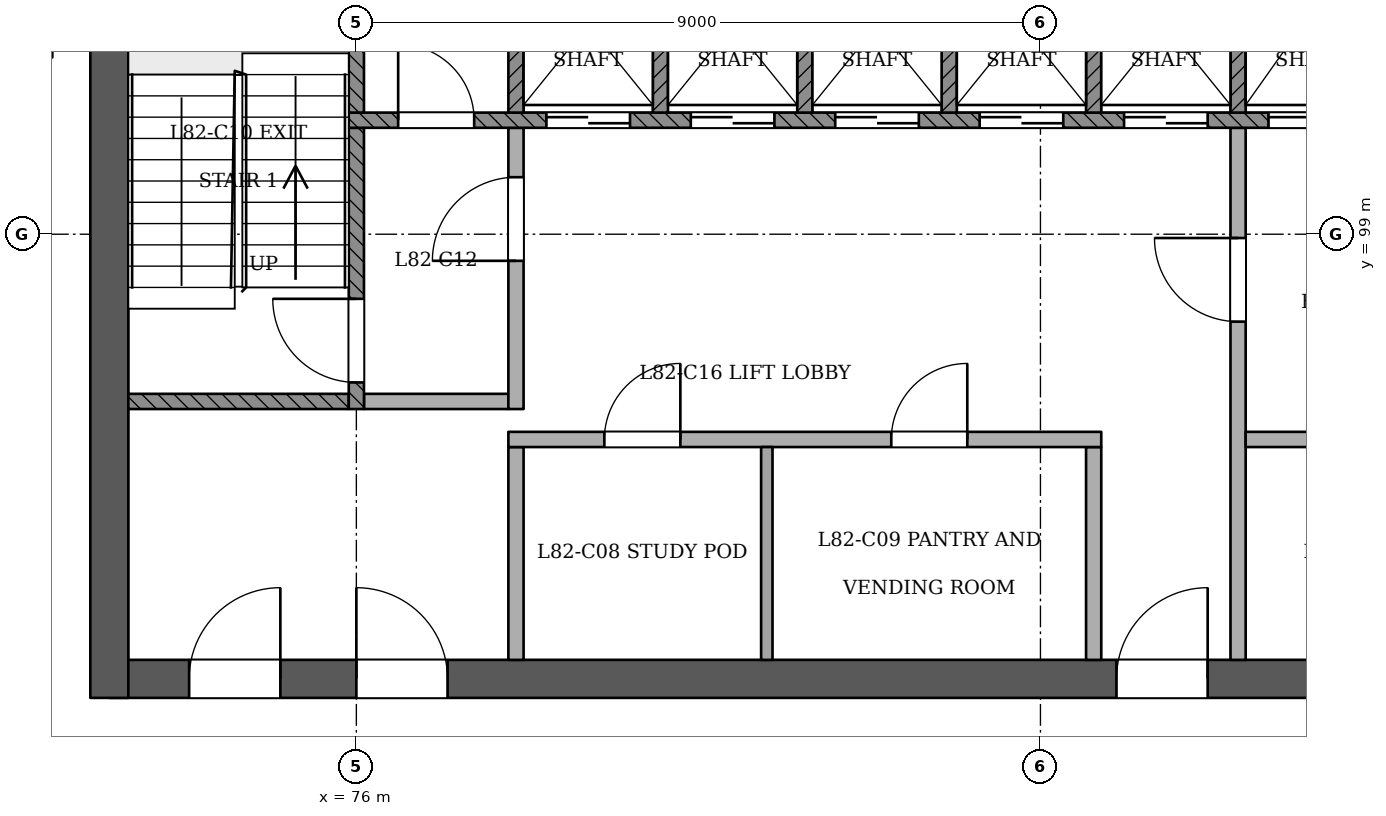
"""IFC4 building model, lengths in metres.
Left out: names, types, materials, properties, quantities, classifications, styles, units other than length and angle.
Written with IfcOpenShell. Run it as: python <this file> out.ifc"""

import sys

from ifc_helpers import new_model, si_unit, direction, frame, frame_2d, origin, place, context, subcontext, project, spatial, rectangle, extrude, element, fill, save


model = new_model("IFC4")
c1 = context("Model", 3, precision=1e-05, world=origin(), true_north=direction((0.0, 1.0)))
c2 = subcontext(c1, "Body", "Model", "MODEL_VIEW")
j1 = project(units=[si_unit("LENGTHUNIT", "METRE"), si_unit("PLANEANGLEUNIT", "RADIAN")], contexts=[c1])
p1 = place(None, origin())
s1 = spatial("IfcSite", under=j1, at=p1, CompositionType="ELEMENT")
p2 = place(p1, origin())
s2 = spatial("IfcBuilding", under=s1, at=p2, CompositionType="ELEMENT")
p3 = place(p2, frame((0.0, 0.0, 316.6)))
s3 = spatial("IfcBuildingStorey", under=s2, at=p3, CompositionType="ELEMENT", Elevation=316.6)
p4 = place(p3, frame((72.75, 93.15, 0.0), z_axis=(0.0, 0.0, 1.0), x_axis=(1.0, 0.0, 0.0)))
e1 = element("IfcWall", 1, at=p4, inside=s3, PredefinedType="SHEAR", context=c2, shape_type="SweptSolid", body=[
    extrude(rectangle(XDim=24.75, YDim=0.5, at=frame_2d((12.375, 0.0))), origin(), (0.0, 0.0, 1.0), 3.6),
])
p5 = place(p4, frame((1.05, 0.0, 0.0)))
e2 = element("IfcOpeningElement", 2, at=p5, cuts=e1, PredefinedType="OPENING", context=c2, shape_type="SweptSolid", body=[
    extrude(rectangle(XDim=1.2, YDim=2.1, at=frame_2d((0.6, 1.05))), frame((0.0, 0.26, 0.0), z_axis=(0.0, -1.0, 0.0), x_axis=(1.0, 0.0, 0.0)), (0.0, 0.0, 1.0), 0.521),
])
p6 = place(p4, frame((3.25, 0.0, 0.0)))
e3 = element("IfcOpeningElement", 3, at=p6, cuts=e1, PredefinedType="OPENING", context=c2, shape_type="SweptSolid", body=[
    extrude(rectangle(XDim=1.2, YDim=2.1, at=frame_2d((0.6, 1.05))), frame((0.0, 0.26, 0.0), z_axis=(0.0, -1.0, 0.0), x_axis=(1.0, 0.0, 0.0)), (0.0, 0.0, 1.0), 0.521),
])
p7 = place(p4, frame((13.25, 0.0, 0.0)))
e4 = element("IfcOpeningElement", 4, at=p7, cuts=e1, PredefinedType="OPENING", context=c2, shape_type="SweptSolid", body=[
    extrude(rectangle(XDim=1.2, YDim=2.1, at=frame_2d((0.6, 1.05))), frame((0.0, 0.26, 0.0), z_axis=(0.0, -1.0, 0.0), x_axis=(1.0, 0.0, 0.0)), (0.0, 0.0, 1.0), 0.521),
])
p8 = place(p4, frame((16.663, 0.0, 0.0)))
e5 = element("IfcOpeningElement", 5, at=p8, cuts=e1, PredefinedType="OPENING", context=c2, shape_type="SweptSolid", body=[
    extrude(rectangle(XDim=1.0, YDim=2.1, at=frame_2d((0.5, 1.05))), frame((0.0, 0.26, 0.0), z_axis=(0.0, -1.0, 0.0), x_axis=(1.0, 0.0, 0.0)), (0.0, 0.0, 1.0), 0.521),
])
p9 = place(p4, frame((20.55, 0.0, 0.0)))
e6 = element("IfcOpeningElement", 6, at=p9, cuts=e1, PredefinedType="OPENING", context=c2, shape_type="SweptSolid", body=[
    extrude(rectangle(XDim=1.0, YDim=2.1, at=frame_2d((0.5, 1.05))), frame((0.0, 0.26, 0.0), z_axis=(0.0, -1.0, 0.0), x_axis=(1.0, 0.0, 0.0)), (0.0, 0.0, 1.0), 0.521),
])
p10 = place(p4, frame((22.988, 0.0, 0.0)))
e7 = element("IfcOpeningElement", 7, at=p10, cuts=e1, PredefinedType="OPENING", context=c2, shape_type="SweptSolid", body=[
    extrude(rectangle(XDim=1.0, YDim=2.1, at=frame_2d((0.5, 1.05))), frame((0.0, 0.26, 0.0), z_axis=(0.0, -1.0, 0.0), x_axis=(1.0, 0.0, 0.0)), (0.0, 0.0, 1.0), 0.521),
])
p11 = place(p3, frame((72.75, 103.65, 0.0), z_axis=(0.0, 0.0, 1.0), x_axis=(0.0, -1.0, 0.0)))
e8 = element("IfcWall", 8, at=p11, inside=s3, PredefinedType="SHEAR", context=c2, shape_type="SweptSolid", body=[
    extrude(rectangle(XDim=10.75, YDim=0.5, at=frame_2d((5.375, 0.0))), origin(), (0.0, 0.0, 1.0), 3.6),
])
p12 = place(p3, frame((78.1, 93.4, 0.0), z_axis=(0.0, 0.0, 1.0), x_axis=(0.0, 1.0, 0.0)))
e9 = element("IfcWall", 9, at=p12, inside=s3, PredefinedType="PARTITIONING", context=c2, shape_type="SweptSolid", body=[
    extrude(rectangle(XDim=2.8, YDim=0.2, at=frame_2d((1.4, 0.0))), origin(), (0.0, 0.0, 1.0), 3.2),
])
p13 = place(p3, frame((81.4, 93.4, 0.0), z_axis=(0.0, 0.0, 1.0), x_axis=(0.0, 1.0, 0.0)))
e10 = element("IfcWall", 10, at=p13, inside=s3, PredefinedType="PARTITIONING", context=c2, shape_type="SweptSolid", body=[
    extrude(rectangle(XDim=2.8, YDim=0.15, at=frame_2d((1.4, 0.0))), origin(), (0.0, 0.0, 1.0), 3.2),
])
p14 = place(p3, frame((85.7, 93.4, 0.0), z_axis=(0.0, 0.0, 1.0), x_axis=(0.0, 1.0, 0.0)))
e11 = element("IfcWall", 11, at=p14, inside=s3, PredefinedType="PARTITIONING", context=c2, shape_type="SweptSolid", body=[
    extrude(rectangle(XDim=2.8, YDim=0.2, at=frame_2d((1.4, 0.0))), origin(), (0.0, 0.0, 1.0), 3.2),
])
p15 = place(p3, frame((87.6, 93.4, 0.0), z_axis=(0.0, 0.0, 1.0), x_axis=(0.0, 1.0, 0.0)))
e12 = element("IfcWall", 12, at=p15, inside=s3, PredefinedType="PARTITIONING", context=c2, shape_type="SweptSolid", body=[
    extrude(rectangle(XDim=7.0, YDim=0.2, at=frame_2d((3.5, 0.0))), origin(), (0.0, 0.0, 1.0), 3.2),
])
p16 = place(p15, frame((4.45, 0.0, 0.0)))
e13 = element("IfcOpeningElement", 13, at=p16, cuts=e12, PredefinedType="OPENING", context=c2, shape_type="SweptSolid", body=[
    extrude(rectangle(XDim=1.1, YDim=2.1, at=frame_2d((0.55, 1.05))), frame((0.0, 0.11, 0.0), z_axis=(0.0, -1.0, 0.0), x_axis=(1.0, 0.0, 0.0)), (0.0, 0.0, 1.0), 0.221),
])
p17 = place(p3, frame((78.0, 96.3, 0.0), z_axis=(0.0, 0.0, 1.0), x_axis=(1.0, 0.0, 0.0)))
e14 = element("IfcWall", 14, at=p17, inside=s3, PredefinedType="PARTITIONING", context=c2, shape_type="SweptSolid", body=[
    extrude(rectangle(XDim=7.8, YDim=0.2, at=frame_2d((3.9, 0.0))), origin(), (0.0, 0.0, 1.0), 3.2),
])
p18 = place(p17, frame((1.262, 0.0, 0.0)))
e15 = element("IfcOpeningElement", 15, at=p18, cuts=e14, PredefinedType="OPENING", context=c2, shape_type="SweptSolid", body=[
    extrude(rectangle(XDim=1.0, YDim=2.1, at=frame_2d((0.5, 1.05))), frame((0.0, 0.11, 0.0), z_axis=(0.0, -1.0, 0.0), x_axis=(1.0, 0.0, 0.0)), (0.0, 0.0, 1.0), 0.221),
])
p19 = place(p17, frame((5.038, 0.0, 0.0)))
e16 = element("IfcOpeningElement", 16, at=p19, cuts=e14, PredefinedType="OPENING", context=c2, shape_type="SweptSolid", body=[
    extrude(rectangle(XDim=1.0, YDim=2.1, at=frame_2d((0.5, 1.05))), frame((0.0, 0.11, 0.0), z_axis=(0.0, -1.0, 0.0), x_axis=(1.0, 0.0, 0.0)), (0.0, 0.0, 1.0), 0.221),
])
p20 = place(p3, frame((87.7, 96.3, 0.0), z_axis=(0.0, 0.0, 1.0), x_axis=(1.0, 0.0, 0.0)))
e17 = element("IfcWall", 17, at=p20, inside=s3, PredefinedType="PARTITIONING", context=c2, shape_type="SweptSolid", body=[
    extrude(rectangle(XDim=3.6, YDim=0.2, at=frame_2d((1.8, 0.0))), origin(), (0.0, 0.0, 1.0), 3.2),
])
p21 = place(p3, frame((73.0, 96.8, 0.0), z_axis=(0.0, 0.0, 1.0), x_axis=(1.0, 0.0, 0.0)))
e18 = element("IfcWall", 18, at=p21, inside=s3, PredefinedType="SOLIDWALL", context=c2, shape_type="SweptSolid", body=[
    extrude(rectangle(XDim=2.9, YDim=0.2, at=frame_2d((1.45, 0.0))), origin(), (0.0, 0.0, 1.0), 3.2),
])
p22 = place(p3, frame((76.0, 96.7, 0.0), z_axis=(0.0, 0.0, 1.0), x_axis=(0.0, 1.0, 0.0)))
e19 = element("IfcWall", 19, at=p22, inside=s3, PredefinedType="SOLIDWALL", context=c2, shape_type="SweptSolid", body=[
    extrude(rectangle(XDim=3.7, YDim=0.2, at=frame_2d((1.85, 0.0))), origin(), (0.0, 0.0, 1.0), 3.2),
])
p23 = place(p22, frame((0.35, 0.0, 0.0)))
e20 = element("IfcOpeningElement", 20, at=p23, cuts=e19, PredefinedType="OPENING", context=c2, shape_type="SweptSolid", body=[
    extrude(rectangle(XDim=1.1, YDim=2.1, at=frame_2d((0.55, 1.05))), frame((0.0, 0.11, 0.0), z_axis=(0.0, -1.0, 0.0), x_axis=(1.0, 0.0, 0.0)), (0.0, 0.0, 1.0), 0.221),
])
p24 = place(p3, frame((76.1, 96.8, 0.0), z_axis=(0.0, 0.0, 1.0), x_axis=(1.0, 0.0, 0.0)))
e21 = element("IfcWall", 21, at=p24, inside=s3, PredefinedType="PARTITIONING", context=c2, shape_type="SweptSolid", body=[
    extrude(rectangle(XDim=1.9, YDim=0.2, at=frame_2d((0.95, 0.0))), origin(), (0.0, 0.0, 1.0), 3.2),
])
p25 = place(p3, frame((78.1, 96.7, 0.0), z_axis=(0.0, 0.0, 1.0), x_axis=(0.0, 1.0, 0.0)))
e22 = element("IfcWall", 22, at=p25, inside=s3, PredefinedType="PARTITIONING", context=c2, shape_type="SweptSolid", body=[
    extrude(rectangle(XDim=3.7, YDim=0.2, at=frame_2d((1.85, 0.0))), origin(), (0.0, 0.0, 1.0), 3.2),
])
p26 = place(p25, frame((1.95, 0.0, 0.0)))
e23 = element("IfcOpeningElement", 23, at=p26, cuts=e22, PredefinedType="OPENING", context=c2, shape_type="SweptSolid", body=[
    extrude(rectangle(XDim=1.1, YDim=2.1, at=frame_2d((0.55, 1.05))), frame((0.0, 0.11, 0.0), z_axis=(0.0, -1.0, 0.0), x_axis=(1.0, 0.0, 0.0)), (0.0, 0.0, 1.0), 0.221),
])
p27 = place(p3, frame((75.9, 100.5, 0.0), z_axis=(0.0, 0.0, 1.0), x_axis=(1.0, 0.0, 0.0)))
e24 = element("IfcWall", 24, at=p27, inside=s3, PredefinedType="SOLIDWALL", context=c2, shape_type="SweptSolid", body=[
    extrude(rectangle(XDim=18.2, YDim=0.2, at=frame_2d((9.1, 0.0))), origin(), (0.0, 0.0, 1.0), 3.2),
])
p28 = place(p27, frame((2.6, 0.0, 0.0)))
e25 = element("IfcOpeningElement", 25, at=p28, cuts=e24, PredefinedType="OPENING", context=c2, shape_type="SweptSolid", body=[
    extrude(rectangle(XDim=1.1, YDim=2.1, at=frame_2d((0.55, 1.05))), frame((0.0, 0.11, 0.0), z_axis=(0.0, -1.0, 0.0), x_axis=(1.0, 0.0, 0.0)), (0.0, 0.0, 1.0), 0.221),
])
p29 = place(p27, frame((4.5, 0.0, 0.0)))
e26 = element("IfcOpeningElement", 26, at=p29, cuts=e24, PredefinedType="OPENING", context=c2, shape_type="SweptSolid", body=[
    extrude(rectangle(XDim=1.1, YDim=2.1, at=frame_2d((0.55, 1.05))), frame((0.0, 0.11, 0.0), z_axis=(0.0, -1.0, 0.0), x_axis=(1.0, 0.0, 0.0)), (0.0, 0.0, 1.0), 0.221),
])
p30 = place(p27, frame((6.4, 0.0, 0.0)))
e27 = element("IfcOpeningElement", 27, at=p30, cuts=e24, PredefinedType="OPENING", context=c2, shape_type="SweptSolid", body=[
    extrude(rectangle(XDim=1.1, YDim=2.1, at=frame_2d((0.55, 1.05))), frame((0.0, 0.11, 0.0), z_axis=(0.0, -1.0, 0.0), x_axis=(1.0, 0.0, 0.0)), (0.0, 0.0, 1.0), 0.221),
])
p31 = place(p27, frame((8.3, 0.0, 0.0)))
e28 = element("IfcOpeningElement", 28, at=p31, cuts=e24, PredefinedType="OPENING", context=c2, shape_type="SweptSolid", body=[
    extrude(rectangle(XDim=1.1, YDim=2.1, at=frame_2d((0.55, 1.05))), frame((0.0, 0.11, 0.0), z_axis=(0.0, -1.0, 0.0), x_axis=(1.0, 0.0, 0.0)), (0.0, 0.0, 1.0), 0.221),
])
p32 = place(p27, frame((10.2, 0.0, 0.0)))
e29 = element("IfcOpeningElement", 29, at=p32, cuts=e24, PredefinedType="OPENING", context=c2, shape_type="SweptSolid", body=[
    extrude(rectangle(XDim=1.1, YDim=2.1, at=frame_2d((0.55, 1.05))), frame((0.0, 0.11, 0.0), z_axis=(0.0, -1.0, 0.0), x_axis=(1.0, 0.0, 0.0)), (0.0, 0.0, 1.0), 0.221),
])
p33 = place(p27, frame((12.1, 0.0, 0.0)))
e30 = element("IfcOpeningElement", 30, at=p33, cuts=e24, PredefinedType="OPENING", context=c2, shape_type="SweptSolid", body=[
    extrude(rectangle(XDim=1.1, YDim=2.1, at=frame_2d((0.55, 1.05))), frame((0.0, 0.11, 0.0), z_axis=(0.0, -1.0, 0.0), x_axis=(1.0, 0.0, 0.0)), (0.0, 0.0, 1.0), 0.221),
])
p34 = place(p27, frame((14.0, 0.0, 0.0)))
e31 = element("IfcOpeningElement", 31, at=p34, cuts=e24, PredefinedType="OPENING", context=c2, shape_type="SweptSolid", body=[
    extrude(rectangle(XDim=1.1, YDim=2.1, at=frame_2d((0.55, 1.05))), frame((0.0, 0.11, 0.0), z_axis=(0.0, -1.0, 0.0), x_axis=(1.0, 0.0, 0.0)), (0.0, 0.0, 1.0), 0.221),
])
p35 = place(p27, frame((0.65, 0.0, 0.0)))
e32 = element("IfcOpeningElement", 32, at=p35, cuts=e24, PredefinedType="OPENING", context=c2, shape_type="SweptSolid", body=[
    extrude(rectangle(XDim=1.0, YDim=2.1, at=frame_2d((0.5, 1.05))), frame((0.0, 0.11, 0.0), z_axis=(0.0, -1.0, 0.0), x_axis=(1.0, 0.0, 0.0)), (0.0, 0.0, 1.0), 0.221),
])
p36 = place(p27, frame((16.3, 0.0, 0.0)))
e33 = element("IfcOpeningElement", 33, at=p36, cuts=e24, PredefinedType="OPENING", context=c2, shape_type="SweptSolid", body=[
    extrude(rectangle(XDim=1.0, YDim=2.1, at=frame_2d((0.5, 1.05))), frame((0.0, 0.11, 0.0), z_axis=(0.0, -1.0, 0.0), x_axis=(1.0, 0.0, 0.0)), (0.0, 0.0, 1.0), 0.221),
])
for number, where, z_axis, x_axis in (
    (34, (76.0, 100.6, 0.0), (0.0, 0.0, 1.0), (0.0, 1.0, 0.0)),
    (35, (78.1, 100.6, 0.0), (0.0, 0.0, 1.0), (0.0, 1.0, 0.0)),
    (36, (80.0, 100.6, 0.0), (0.0, 0.0, 1.0), (0.0, 1.0, 0.0)),
    (37, (81.9, 100.6, 0.0), (0.0, 0.0, 1.0), (0.0, 1.0, 0.0)),
    (38, (83.8, 100.6, 0.0), (0.0, 0.0, 1.0), (0.0, 1.0, 0.0)),
    (39, (85.7, 100.6, 0.0), (0.0, 0.0, 1.0), (0.0, 1.0, 0.0)),
    (40, (87.6, 100.6, 0.0), (0.0, 0.0, 1.0), (0.0, 1.0, 0.0)),
):
    element("IfcWall", number, at=place(p3, frame(where, z_axis=z_axis, x_axis=x_axis)), inside=s3, PredefinedType="SOLIDWALL", context=c2, shape_type="SweptSolid", body=[
        extrude(rectangle(XDim=2.8, YDim=0.2, at=frame_2d((1.4, 0.0))), origin(), (0.0, 0.0, 1.0), 3.2),
    ])
p37 = place(p28, origin())
e41 = element("IfcDoor", 41, at=p37, inside=s3, OperationType="SLIDING_TO_RIGHT", PredefinedType="NOTDEFINED", context=c2, shape_type="SweptSolid", body=[
    extrude(rectangle(XDim=1.1, YDim=2.1, at=frame_2d((0.55, 1.05))), frame((0.0, 0.025, 0.0), z_axis=(0.0, -1.0, 0.0), x_axis=(1.0, 0.0, 0.0)), (0.0, 0.0, 1.0), 0.05),
])
fill(e25, e41)
p38 = place(p29, origin())
e42 = element("IfcDoor", 42, at=p38, inside=s3, OperationType="SLIDING_TO_LEFT", PredefinedType="NOTDEFINED", context=c2, shape_type="SweptSolid", body=[
    extrude(rectangle(XDim=1.1, YDim=2.1, at=frame_2d((0.55, 1.05))), frame((0.0, 0.025, 0.0), z_axis=(0.0, -1.0, 0.0), x_axis=(1.0, 0.0, 0.0)), (0.0, 0.0, 1.0), 0.05),
])
fill(e26, e42)
p39 = place(p30, origin())
e43 = element("IfcDoor", 43, at=p39, inside=s3, OperationType="SLIDING_TO_RIGHT", PredefinedType="NOTDEFINED", context=c2, shape_type="SweptSolid", body=[
    extrude(rectangle(XDim=1.1, YDim=2.1, at=frame_2d((0.55, 1.05))), frame((0.0, 0.025, 0.0), z_axis=(0.0, -1.0, 0.0), x_axis=(1.0, 0.0, 0.0)), (0.0, 0.0, 1.0), 0.05),
])
fill(e27, e43)
p40 = place(p31, origin())
e44 = element("IfcDoor", 44, at=p40, inside=s3, OperationType="SLIDING_TO_LEFT", PredefinedType="NOTDEFINED", context=c2, shape_type="SweptSolid", body=[
    extrude(rectangle(XDim=1.1, YDim=2.1, at=frame_2d((0.55, 1.05))), frame((0.0, 0.025, 0.0), z_axis=(0.0, -1.0, 0.0), x_axis=(1.0, 0.0, 0.0)), (0.0, 0.0, 1.0), 0.05),
])
fill(e28, e44)
p41 = place(p32, origin())
e45 = element("IfcDoor", 45, at=p41, inside=s3, OperationType="SLIDING_TO_RIGHT", PredefinedType="NOTDEFINED", context=c2, shape_type="SweptSolid", body=[
    extrude(rectangle(XDim=1.1, YDim=2.1, at=frame_2d((0.55, 1.05))), frame((0.0, 0.025, 0.0), z_axis=(0.0, -1.0, 0.0), x_axis=(1.0, 0.0, 0.0)), (0.0, 0.0, 1.0), 0.05),
])
fill(e29, e45)
p42 = place(p33, origin())
e46 = element("IfcDoor", 46, at=p42, inside=s3, OperationType="SLIDING_TO_RIGHT", PredefinedType="NOTDEFINED", context=c2, shape_type="SweptSolid", body=[
    extrude(rectangle(XDim=1.1, YDim=2.1, at=frame_2d((0.55, 1.05))), frame((0.0, 0.025, 0.0), z_axis=(0.0, -1.0, 0.0), x_axis=(1.0, 0.0, 0.0)), (0.0, 0.0, 1.0), 0.05),
])
fill(e30, e46)
p43 = place(p23, origin())
e47 = element("IfcDoor", 47, at=p43, inside=s3, OperationType="SINGLE_SWING_RIGHT", PredefinedType="NOTDEFINED", context=c2, shape_type="SweptSolid", body=[
    extrude(rectangle(XDim=1.1, YDim=2.1, at=frame_2d((0.55, 1.05))), frame((0.0, 0.025, 0.0), z_axis=(0.0, -1.0, 0.0), x_axis=(1.0, 0.0, 0.0)), (0.0, 0.0, 1.0), 0.05),
])
fill(e20, e47)
p44 = place(p26, origin())
e48 = element("IfcDoor", 48, at=p44, inside=s3, OperationType="SINGLE_SWING_LEFT", PredefinedType="NOTDEFINED", context=c2, shape_type="SweptSolid", body=[
    extrude(rectangle(XDim=1.1, YDim=2.1, at=frame_2d((0.55, 1.05))), frame((0.0, 0.025, 0.0), z_axis=(0.0, -1.0, 0.0), x_axis=(1.0, 0.0, 0.0)), (0.0, 0.0, 1.0), 0.05),
])
fill(e23, e48)
p45 = place(p16, origin())
e49 = element("IfcDoor", 49, at=p45, inside=s3, OperationType="SINGLE_SWING_RIGHT", PredefinedType="NOTDEFINED", context=c2, shape_type="SweptSolid", body=[
    extrude(rectangle(XDim=1.1, YDim=2.1, at=frame_2d((0.55, 1.05))), frame((0.0, 0.025, 0.0), z_axis=(0.0, -1.0, 0.0), x_axis=(1.0, 0.0, 0.0)), (0.0, 0.0, 1.0), 0.05),
])
fill(e13, e49)
p46 = place(p5, origin())
e50 = element("IfcDoor", 50, at=p46, inside=s3, OperationType="SINGLE_SWING_RIGHT", PredefinedType="NOTDEFINED", context=c2, shape_type="SweptSolid", body=[
    extrude(rectangle(XDim=1.2, YDim=2.1, at=frame_2d((0.6, 1.05))), frame((0.0, 0.025, 0.0), z_axis=(0.0, -1.0, 0.0), x_axis=(1.0, 0.0, 0.0)), (0.0, 0.0, 1.0), 0.05),
])
fill(e2, e50)
p47 = place(p6, origin())
e51 = element("IfcDoor", 51, at=p47, inside=s3, OperationType="SINGLE_SWING_LEFT", PredefinedType="NOTDEFINED", context=c2, shape_type="SweptSolid", body=[
    extrude(rectangle(XDim=1.2, YDim=2.1, at=frame_2d((0.6, 1.05))), frame((0.0, 0.025, 0.0), z_axis=(0.0, -1.0, 0.0), x_axis=(1.0, 0.0, 0.0)), (0.0, 0.0, 1.0), 0.05),
])
fill(e3, e51)
p48 = place(p7, origin())
e52 = element("IfcDoor", 52, at=p48, inside=s3, OperationType="SINGLE_SWING_RIGHT", PredefinedType="NOTDEFINED", context=c2, shape_type="SweptSolid", body=[
    extrude(rectangle(XDim=1.2, YDim=2.1, at=frame_2d((0.6, 1.05))), frame((0.0, 0.025, 0.0), z_axis=(0.0, -1.0, 0.0), x_axis=(1.0, 0.0, 0.0)), (0.0, 0.0, 1.0), 0.05),
])
fill(e4, e52)
p49 = place(p35, origin())
e53 = element("IfcDoor", 53, at=p49, inside=s3, OperationType="SINGLE_SWING_LEFT", PredefinedType="NOTDEFINED", context=c2, shape_type="SweptSolid", body=[
    extrude(rectangle(XDim=1.0, YDim=2.1, at=frame_2d((0.5, 1.05))), frame((0.0, 0.025, 0.0), z_axis=(0.0, -1.0, 0.0), x_axis=(1.0, 0.0, 0.0)), (0.0, 0.0, 1.0), 0.05),
])
fill(e32, e53)
p50 = place(p18, origin())
e54 = element("IfcDoor", 54, at=p50, inside=s3, OperationType="SINGLE_SWING_RIGHT", PredefinedType="NOTDEFINED", context=c2, shape_type="SweptSolid", body=[
    extrude(rectangle(XDim=1.0, YDim=2.1, at=frame_2d((0.5, 1.05))), frame((0.0, 0.025, 0.0), z_axis=(0.0, -1.0, 0.0), x_axis=(1.0, 0.0, 0.0)), (0.0, 0.0, 1.0), 0.05),
])
fill(e15, e54)
p51 = place(p19, origin())
e55 = element("IfcDoor", 55, at=p51, inside=s3, OperationType="SINGLE_SWING_RIGHT", PredefinedType="NOTDEFINED", context=c2, shape_type="SweptSolid", body=[
    extrude(rectangle(XDim=1.0, YDim=2.1, at=frame_2d((0.5, 1.05))), frame((0.0, 0.025, 0.0), z_axis=(0.0, -1.0, 0.0), x_axis=(1.0, 0.0, 0.0)), (0.0, 0.0, 1.0), 0.05),
])
fill(e16, e55)
save(model, sys.argv[1])
